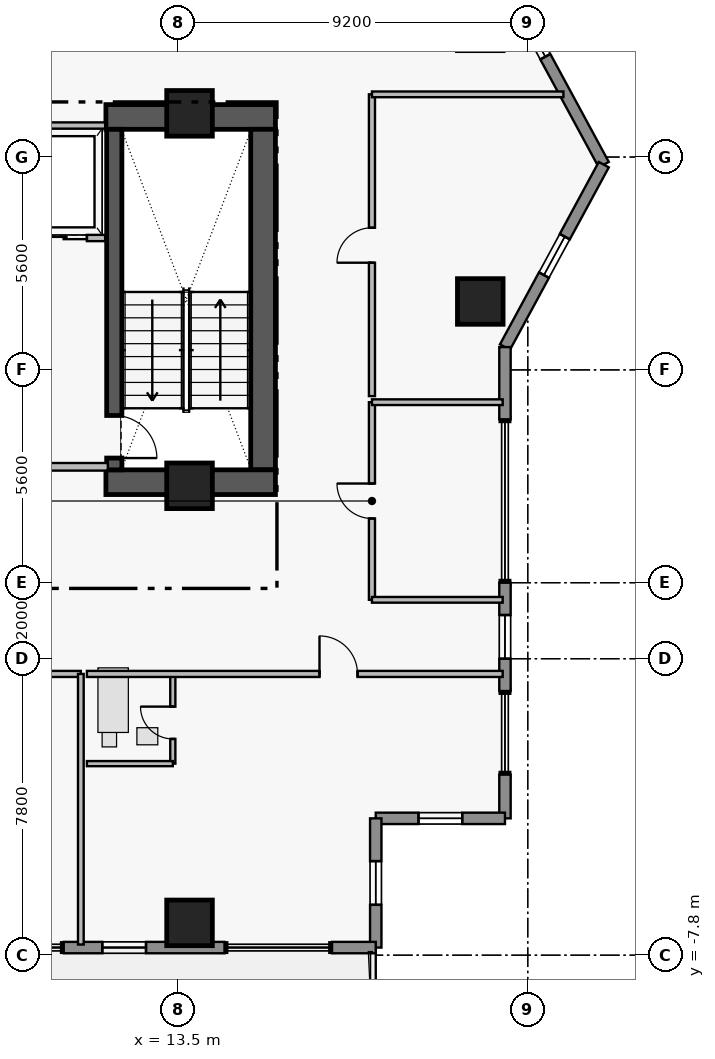
"""IFC4 building model, lengths in metres.
Left out: names, types, materials, properties, quantities, classifications, styles, units other than length and angle.
Written with IfcOpenShell. Run it as: python <this file> out.ifc"""

import sys

from ifc_helpers import new_model, si_unit, direction, frame, frame_2d, origin, origin_2d, place, context, subcontext, project, spatial, rectangle, extrude, element, fill, save


model = new_model("IFC4")
c1 = context("Model", 3, precision=1e-05, world=origin(), true_north=direction((0.0, 1.0)))
c2 = subcontext(c1, "Body", "Model", "MODEL_VIEW")
j1 = project(units=[si_unit("LENGTHUNIT", "METRE"), si_unit("PLANEANGLEUNIT", "RADIAN")], contexts=[c1])
p1 = place(None, origin())
s1 = spatial("IfcSite", under=j1, at=p1, CompositionType="ELEMENT")
p2 = place(p1, origin())
s2 = spatial("IfcBuilding", under=s1, at=p2, CompositionType="ELEMENT")
p3 = place(p2, frame((0.0, 0.0, 214.9)))
s3 = spatial("IfcBuildingStorey", under=s2, at=p3, CompositionType="ELEMENT", Elevation=214.9)
p4 = place(p3, frame((11.6, 14.255, 0.0), z_axis=(0.0, 0.0, 1.0), x_axis=(1.0, 0.0, 0.0)))
e1 = element("IfcWall", 1, at=p4, inside=s3, PredefinedType="SHEAR", context=c2, shape_type="SweptSolid", body=[
    extrude(rectangle(XDim=4.46, YDim=0.65, at=frame_2d((2.23, 0.0))), origin(), (0.0, 0.0, 1.0), 3.56),
])
p5 = place(p3, frame((15.735, 4.97, 0.0), z_axis=(0.0, 0.0, 1.0), x_axis=(0.0, 1.0, 0.0)))
e2 = element("IfcWall", 2, at=p5, inside=s3, PredefinedType="SHEAR", context=c2, shape_type="SweptSolid", body=[
    extrude(rectangle(XDim=8.96, YDim=0.65, at=frame_2d((4.48, 0.0))), origin(), (0.0, 0.0, 1.0), 3.56),
])
p6 = place(p3, frame((11.6, 4.645, 0.0), z_axis=(0.0, 0.0, 1.0), x_axis=(1.0, 0.0, 0.0)))
e3 = element("IfcWall", 3, at=p6, inside=s3, PredefinedType="SHEAR", context=c2, shape_type="SweptSolid", body=[
    extrude(rectangle(XDim=4.46, YDim=0.65, at=frame_2d((2.23, 0.0))), origin(), (0.0, 0.0, 1.0), 3.56),
])
p7 = place(p3, frame((11.82, 13.93, 0.0), z_axis=(0.0, 0.0, 1.0), x_axis=(0.0, -1.0, 0.0)))
e4 = element("IfcWall", 4, at=p7, inside=s3, PredefinedType="SHEAR", context=c2, shape_type="SweptSolid", body=[
    extrude(rectangle(XDim=8.96, YDim=0.4, at=frame_2d((4.48, 0.0))), origin(), (0.0, 0.0, 1.0), 3.56),
])
p8 = place(p7, frame((7.53, 0.0, 0.0)))
e5 = element("IfcOpeningElement", 5, at=p8, cuts=e4, PredefinedType="OPENING", context=c2, shape_type="SweptSolid", body=[
    extrude(rectangle(XDim=1.12, YDim=2.22, at=frame_2d((0.56, 1.11))), frame((0.0, 0.21, 0.0), z_axis=(0.0, -1.0, 0.0), x_axis=(1.0, 0.0, 0.0)), (0.0, 0.0, 1.0), 0.42),
])
for number, where, z_axis, x_axis in (
    (6, (13.8, 14.35, 0.0), (0.0, 0.0, 1.0), (1.0, 0.0, 0.0)),
    (7, (13.8, 4.55, 0.0), (0.0, 0.0, 1.0), (1.0, 0.0, 0.0)),
    (8, (13.8, -6.95, 0.0), (0.0, 0.0, 1.0), (1.0, 0.0, 0.0)),
    (9, (21.45, 9.4, 0.0), (0.0, 0.0, 1.0), (1.0, 0.0, 0.0)),
):
    element("IfcColumn", number, at=place(p3, frame(where, z_axis=z_axis, x_axis=x_axis)), inside=s3, PredefinedType="COLUMN", context=c2, shape_type="SweptSolid", body=[
        extrude(rectangle(XDim=1.2, YDim=1.2, at=origin_2d()), origin(), (0.0, 0.0, 1.0), 3.75),
    ])
p9 = place(p3, frame((22.1, 17.8, 0.0), z_axis=(0.0, 0.0, 1.0), x_axis=(0.476258655584, -0.879305233114, 0.0)))
e10 = element("IfcWall", 10, at=p9, inside=s3, PredefinedType="STANDARD", context=c2, shape_type="SweptSolid", body=[
    extrude(rectangle(XDim=5.459, YDim=0.3, at=frame_2d((2.729, 0.0))), origin(), (0.0, 0.0, 1.0), 3.53),
])
p10 = place(p9, frame((1.078, 0.0, 1.25)))
e11 = element("IfcOpeningElement", 11, at=p10, cuts=e10, PredefinedType="OPENING", context=c2, shape_type="SweptSolid", body=[
    extrude(rectangle(XDim=1.15, YDim=1.55, at=frame_2d((0.575, 0.775))), frame((0.0, 0.16, 0.0), z_axis=(0.0, -1.0, 0.0), x_axis=(1.0, 0.0, 0.0)), (0.0, 0.0, 1.0), 0.32),
])
p11 = place(p3, frame((24.7, 13.0, 0.0), z_axis=(0.0, 0.0, 1.0), x_axis=(-0.476258655584, -0.879305233114, 0.0)))
e12 = element("IfcWall", 12, at=p11, inside=s3, PredefinedType="STANDARD", context=c2, shape_type="SweptSolid", body=[
    extrude(rectangle(XDim=5.459, YDim=0.3, at=frame_2d((2.729, 0.0))), origin(), (0.0, 0.0, 1.0), 3.53),
])
p12 = place(p11, frame((2.155, 0.0, 1.25)))
e13 = element("IfcOpeningElement", 13, at=p12, cuts=e12, PredefinedType="OPENING", context=c2, shape_type="SweptSolid", body=[
    extrude(rectangle(XDim=1.15, YDim=1.55, at=frame_2d((0.575, 0.775))), frame((0.0, 0.16, 0.0), z_axis=(0.0, -1.0, 0.0), x_axis=(1.0, 0.0, 0.0)), (0.0, 0.0, 1.0), 0.32),
])
p13 = place(p3, frame((22.1, 8.2, 0.0), z_axis=(0.0, 0.0, 1.0), x_axis=(0.0, -1.0, 0.0)))
e14 = element("IfcWall", 14, at=p13, inside=s3, PredefinedType="STANDARD", context=c2, shape_type="SweptSolid", body=[
    extrude(rectangle(XDim=1.9, YDim=0.3, at=frame_2d((0.95, 0.0))), origin(), (0.0, 0.0, 1.0), 3.53),
])
p14 = place(p3, frame((22.1, 2.0, 0.0), z_axis=(0.0, 0.0, 1.0), x_axis=(0.0, -1.0, 0.0)))
e15 = element("IfcWall", 15, at=p14, inside=s3, PredefinedType="STANDARD", context=c2, shape_type="SweptSolid", body=[
    extrude(rectangle(XDim=2.85, YDim=0.3, at=frame_2d((1.425, 0.0))), origin(), (0.0, 0.0, 1.0), 3.53),
])
p15 = place(p14, frame((0.85, 0.0, 0.95)))
e16 = element("IfcOpeningElement", 16, at=p15, cuts=e15, PredefinedType="OPENING", context=c2, shape_type="SweptSolid", body=[
    extrude(rectangle(XDim=1.15, YDim=1.55, at=frame_2d((0.575, 0.775))), frame((0.0, 0.16, 0.0), z_axis=(0.0, -1.0, 0.0), x_axis=(1.0, 0.0, 0.0)), (0.0, 0.0, 1.0), 0.32),
])
p16 = place(p3, frame((22.1, -3.05, 0.0), z_axis=(0.0, 0.0, 1.0), x_axis=(0.0, -1.0, 0.0)))
e17 = element("IfcWall", 17, at=p16, inside=s3, PredefinedType="STANDARD", context=c2, shape_type="SweptSolid", body=[
    extrude(rectangle(XDim=1.15, YDim=0.3, at=frame_2d((0.575, 0.0))), origin(), (0.0, 0.0, 1.0), 3.53),
])
p17 = place(p3, frame((22.1, -4.2, 0.0), z_axis=(0.0, 0.0, 1.0), x_axis=(-1.0, 0.0, 0.0)))
e18 = element("IfcWall", 18, at=p17, inside=s3, PredefinedType="STANDARD", context=c2, shape_type="SweptSolid", body=[
    extrude(rectangle(XDim=3.4, YDim=0.3, at=frame_2d((1.7, 0.0))), origin(), (0.0, 0.0, 1.0), 3.53),
])
p18 = place(p17, frame((1.125, 0.0, 1.25)))
e19 = element("IfcOpeningElement", 19, at=p18, cuts=e18, PredefinedType="OPENING", context=c2, shape_type="SweptSolid", body=[
    extrude(rectangle(XDim=1.15, YDim=1.55, at=frame_2d((0.575, 0.775))), frame((0.0, 0.16, 0.0), z_axis=(0.0, -1.0, 0.0), x_axis=(1.0, 0.0, 0.0)), (0.0, 0.0, 1.0), 0.32),
])
p19 = place(p3, frame((18.7, -4.2, 0.0), z_axis=(0.0, 0.0, 1.0), x_axis=(0.0, -1.0, 0.0)))
e20 = element("IfcWall", 20, at=p19, inside=s3, PredefinedType="STANDARD", context=c2, shape_type="SweptSolid", body=[
    extrude(rectangle(XDim=3.4, YDim=0.3, at=frame_2d((1.7, 0.0))), origin(), (0.0, 0.0, 1.0), 3.53),
])
p20 = place(p19, frame((1.125, 0.0, 1.25)))
e21 = element("IfcOpeningElement", 21, at=p20, cuts=e20, PredefinedType="OPENING", context=c2, shape_type="SweptSolid", body=[
    extrude(rectangle(XDim=1.15, YDim=1.55, at=frame_2d((0.575, 0.775))), frame((0.0, 0.16, 0.0), z_axis=(0.0, -1.0, 0.0), x_axis=(1.0, 0.0, 0.0)), (0.0, 0.0, 1.0), 0.32),
])
p21 = place(p3, frame((18.7, -7.6, 0.0), z_axis=(0.0, 0.0, 1.0), x_axis=(-1.0, 0.0, 0.0)))
e22 = element("IfcWall", 22, at=p21, inside=s3, PredefinedType="STANDARD", context=c2, shape_type="SweptSolid", body=[
    extrude(rectangle(XDim=1.15, YDim=0.3, at=frame_2d((0.575, 0.0))), origin(), (0.0, 0.0, 1.0), 3.53),
])
p22 = place(p3, frame((14.72, -7.6, 0.0), z_axis=(0.0, 0.0, 1.0), x_axis=(-1.0, 0.0, 0.0)))
e23 = element("IfcWall", 23, at=p22, inside=s3, PredefinedType="STANDARD", context=c2, shape_type="SweptSolid", body=[
    extrude(rectangle(XDim=4.23, YDim=0.3, at=frame_2d((2.115, 0.0))), origin(), (0.0, 0.0, 1.0), 3.53),
])
p23 = place(p22, frame((2.065, 0.0, 0.95)))
e24 = element("IfcOpeningElement", 24, at=p23, cuts=e23, PredefinedType="OPENING", context=c2, shape_type="SweptSolid", body=[
    extrude(rectangle(XDim=1.15, YDim=1.55, at=frame_2d((0.575, 0.775))), frame((0.0, 0.16, 0.0), z_axis=(0.0, -1.0, 0.0), x_axis=(1.0, 0.0, 0.0)), (0.0, 0.0, 1.0), 0.32),
])
p24 = place(p3, frame((9.42, 11.07, 0.0), z_axis=(0.0, 0.0, 1.0), x_axis=(1.0, 0.0, 0.0)))
e25 = element("IfcWall", 25, at=p24, inside=s3, PredefinedType="PARTITIONING", context=c2, shape_type="SweptSolid", body=[
    extrude(rectangle(XDim=2.16, YDim=0.165, at=frame_2d((1.08, 0.0))), origin(), (0.0, 0.0, 1.0), 3.53),
])
p25 = place(p24, frame((0.53, 0.0, 0.0)))
e26 = element("IfcOpeningElement", 26, at=p25, cuts=e25, PredefinedType="OPENING", context=c2, shape_type="SweptSolid", body=[
    extrude(rectangle(XDim=1.15, YDim=2.25, at=frame_2d((0.575, 1.125))), frame((0.0, 0.093, 0.0), z_axis=(0.0, -1.0, 0.0), x_axis=(1.0, 0.0, 0.0)), (0.0, 0.0, 1.0), 0.185),
])
p26 = place(p3, frame((0.0, -0.4, 0.0), z_axis=(0.0, 0.0, 1.0), x_axis=(1.0, 0.0, 0.0)))
e27 = element("IfcWall", 27, at=p26, inside=s3, PredefinedType="PARTITIONING", context=c2, shape_type="SweptSolid", body=[
    extrude(rectangle(XDim=10.94, YDim=0.16, at=frame_2d((5.47, 0.0))), origin(), (0.0, 0.0, 1.0), 3.53),
])
p27 = place(p26, frame((6.12, 0.0, 0.0)))
e28 = element("IfcOpeningElement", 28, at=p27, cuts=e27, PredefinedType="OPENING", context=c2, shape_type="SweptSolid", body=[
    extrude(rectangle(XDim=1.0, YDim=2.15, at=frame_2d((0.5, 1.075))), frame((0.0, 0.09, 0.0), z_axis=(0.0, -1.0, 0.0), x_axis=(1.0, 0.0, 0.0)), (0.0, 0.0, 1.0), 0.18),
])
p28 = place(p3, frame((13.36, -2.76, 0.0), z_axis=(0.0, 0.0, 1.0), x_axis=(0.0, 1.0, 0.0)))
e29 = element("IfcWall", 29, at=p28, inside=s3, PredefinedType="PLUMBINGWALL", context=c2, shape_type="SweptSolid", body=[
    extrude(rectangle(XDim=2.36, YDim=0.135, at=frame_2d((1.18, 0.0))), origin(), (0.0, 0.0, 1.0), 2.923),
])
p29 = place(p28, frame((0.65, 0.0, 0.0)))
e30 = element("IfcOpeningElement", 30, at=p29, cuts=e29, PredefinedType="OPENING", context=c2, shape_type="SweptSolid", body=[
    extrude(rectangle(XDim=0.85, YDim=2.1, at=frame_2d((0.425, 1.05))), frame((0.0, 0.077, 0.0), z_axis=(0.0, -1.0, 0.0), x_axis=(1.0, 0.0, 0.0)), (0.0, 0.0, 1.0), 0.155),
])
p30 = place(p3, frame((11.1, -0.4, 0.0), z_axis=(0.0, 0.0, 1.0), x_axis=(1.0, 0.0, 0.0)))
e31 = element("IfcWall", 31, at=p30, inside=s3, PredefinedType="PARTITIONING", context=c2, shape_type="SweptSolid", body=[
    extrude(rectangle(XDim=10.94, YDim=0.16, at=frame_2d((5.47, 0.0))), origin(), (0.0, 0.0, 1.0), 3.53),
])
p31 = place(p30, frame((6.12, 0.0, 0.0)))
e32 = element("IfcOpeningElement", 32, at=p31, cuts=e31, PredefinedType="OPENING", context=c2, shape_type="SweptSolid", body=[
    extrude(rectangle(XDim=1.0, YDim=2.15, at=frame_2d((0.5, 1.075))), frame((0.0, 0.09, 0.0), z_axis=(0.0, -1.0, 0.0), x_axis=(1.0, 0.0, 0.0)), (0.0, 0.0, 1.0), 0.18),
])
p32 = place(p3, frame((18.6, 1.55, 0.0), z_axis=(0.0, 0.0, 1.0), x_axis=(0.0, 1.0, 0.0)))
e33 = element("IfcWall", 33, at=p32, inside=s3, PredefinedType="PARTITIONING", context=c2, shape_type="SweptSolid", body=[
    extrude(rectangle(XDim=5.2, YDim=0.16, at=frame_2d((2.6, 0.0))), origin(), (0.0, 0.0, 1.0), 3.53),
])
p33 = place(p32, frame((2.14, 0.0, 0.0)))
e34 = element("IfcOpeningElement", 34, at=p33, cuts=e33, PredefinedType="OPENING", context=c2, shape_type="SweptSolid", body=[
    extrude(rectangle(XDim=0.92, YDim=2.12, at=frame_2d((0.46, 1.06))), frame((0.0, 0.09, 0.0), z_axis=(0.0, -1.0, 0.0), x_axis=(1.0, 0.0, 0.0)), (0.0, 0.0, 1.0), 0.18),
])
p34 = place(p3, frame((18.6, 6.91, 0.0), z_axis=(0.0, 0.0, 1.0), x_axis=(0.0, 1.0, 0.0)))
e35 = element("IfcWall", 35, at=p34, inside=s3, PredefinedType="PARTITIONING", context=c2, shape_type="SweptSolid", body=[
    extrude(rectangle(XDim=7.94, YDim=0.16, at=frame_2d((3.97, 0.0))), origin(), (0.0, 0.0, 1.0), 3.53),
])
p35 = place(p34, frame((3.51, 0.0, 0.0)))
e36 = element("IfcOpeningElement", 36, at=p35, cuts=e35, PredefinedType="OPENING", context=c2, shape_type="SweptSolid", body=[
    extrude(rectangle(XDim=0.92, YDim=2.12, at=frame_2d((0.46, 1.06))), frame((0.0, 0.09, 0.0), z_axis=(0.0, -1.0, 0.0), x_axis=(1.0, 0.0, 0.0)), (0.0, 0.0, 1.0), 0.18),
])
p36 = place(p3, frame((8.8, 5.05, 0.0), z_axis=(0.0, 0.0, 1.0), x_axis=(1.0, 0.0, 0.0)))
e37 = element("IfcWall", 37, at=p36, inside=s3, PredefinedType="PARTITIONING", context=c2, shape_type="SweptSolid", body=[
    extrude(rectangle(XDim=2.85, YDim=0.2, at=frame_2d((1.425, 0.0))), origin(), (0.0, 0.0, 1.0), 3.53),
])
p37 = place(p3, frame((9.42, 14.03, 0.0), z_axis=(0.0, 0.0, 1.0), x_axis=(1.0, 0.0, 0.0)))
e38 = element("IfcWall", 38, at=p37, inside=s3, PredefinedType="PARTITIONING", context=c2, shape_type="SweptSolid", body=[
    extrude(rectangle(XDim=2.16, YDim=0.165, at=frame_2d((1.08, 0.0))), origin(), (0.0, 0.0, 1.0), 3.53),
])
p38 = place(p3, frame((10.94, -7.52, 0.0), z_axis=(0.0, 0.0, 1.0), x_axis=(0.0, 1.0, 0.0)))
e39 = element("IfcWall", 39, at=p38, inside=s3, PredefinedType="PARTITIONING", context=c2, shape_type="SweptSolid", body=[
    extrude(rectangle(XDim=7.12, YDim=0.15, at=frame_2d((3.56, 0.0))), origin(), (0.0, 0.0, 1.0), 3.53),
])
p39 = place(p3, frame((11.1, -2.76, 0.0), z_axis=(0.0, 0.0, 1.0), x_axis=(1.0, 0.0, 0.0)))
e40 = element("IfcWall", 40, at=p39, inside=s3, PredefinedType="PLUMBINGWALL", context=c2, shape_type="SweptSolid", body=[
    extrude(rectangle(XDim=2.26, YDim=0.135, at=frame_2d((1.13, 0.0))), origin(), (0.0, 0.0, 1.0), 3.124),
])
for number, where, z_axis, x_axis in (
    (41, (18.6, 1.55, 0.0), (0.0, 0.0, 1.0), (1.0, 0.0, 0.0)),
    (42, (18.6, 6.75, 0.0), (0.0, 0.0, 1.0), (1.0, 0.0, 0.0)),
):
    element("IfcWall", number, at=place(p3, frame(where, z_axis=z_axis, x_axis=x_axis)), inside=s3, PredefinedType="PARTITIONING", context=c2, shape_type="SweptSolid", body=[
        extrude(rectangle(XDim=3.44, YDim=0.15, at=frame_2d((1.72, 0.0))), origin(), (0.0, 0.0, 1.0), 3.53),
    ])
p40 = place(p3, frame((18.6, 14.85, 0.0), z_axis=(0.0, 0.0, 1.0), x_axis=(1.0, 0.0, 0.0)))
e43 = element("IfcWall", 43, at=p40, inside=s3, PredefinedType="PARTITIONING", context=c2, shape_type="SweptSolid", body=[
    extrude(rectangle(XDim=5.038, YDim=0.15, at=frame_2d((2.519, 0.0))), origin(), (0.0, 0.0, 1.0), 3.53),
])
p41 = place(p10, origin())
e44 = element("IfcWindow", 44, at=p41, inside=s3, PartitioningType="SINGLE_PANEL", PredefinedType="WINDOW", context=c2, shape_type="SweptSolid", body=[
    extrude(rectangle(XDim=1.15, YDim=1.55, at=frame_2d((0.575, 0.775))), frame((0.0, 0.03, 0.0), z_axis=(0.0, -1.0, 0.0), x_axis=(1.0, 0.0, 0.0)), (0.0, 0.0, 1.0), 0.06),
])
fill(e11, e44)
p42 = place(p12, origin())
e45 = element("IfcWindow", 45, at=p42, inside=s3, PartitioningType="SINGLE_PANEL", PredefinedType="WINDOW", context=c2, shape_type="SweptSolid", body=[
    extrude(rectangle(XDim=1.15, YDim=1.55, at=frame_2d((0.575, 0.775))), frame((0.0, 0.03, 0.0), z_axis=(0.0, -1.0, 0.0), x_axis=(1.0, 0.0, 0.0)), (0.0, 0.0, 1.0), 0.06),
])
fill(e13, e45)
p43 = place(p15, origin())
e46 = element("IfcWindow", 46, at=p43, inside=s3, PartitioningType="SINGLE_PANEL", PredefinedType="WINDOW", context=c2, shape_type="SweptSolid", body=[
    extrude(rectangle(XDim=1.15, YDim=1.55, at=frame_2d((0.575, 0.775))), frame((0.0, 0.03, 0.0), z_axis=(0.0, -1.0, 0.0), x_axis=(1.0, 0.0, 0.0)), (0.0, 0.0, 1.0), 0.06),
])
fill(e16, e46)
p44 = place(p18, origin())
e47 = element("IfcWindow", 47, at=p44, inside=s3, PartitioningType="SINGLE_PANEL", PredefinedType="WINDOW", context=c2, shape_type="SweptSolid", body=[
    extrude(rectangle(XDim=1.15, YDim=1.55, at=frame_2d((0.575, 0.775))), frame((0.0, 0.03, 0.0), z_axis=(0.0, -1.0, 0.0), x_axis=(1.0, 0.0, 0.0)), (0.0, 0.0, 1.0), 0.06),
])
fill(e19, e47)
p45 = place(p20, origin())
e48 = element("IfcWindow", 48, at=p45, inside=s3, PartitioningType="SINGLE_PANEL", PredefinedType="WINDOW", context=c2, shape_type="SweptSolid", body=[
    extrude(rectangle(XDim=1.15, YDim=1.55, at=frame_2d((0.575, 0.775))), frame((0.0, 0.03, 0.0), z_axis=(0.0, -1.0, 0.0), x_axis=(1.0, 0.0, 0.0)), (0.0, 0.0, 1.0), 0.06),
])
fill(e21, e48)
p46 = place(p23, origin())
e49 = element("IfcWindow", 49, at=p46, inside=s3, PartitioningType="SINGLE_PANEL", PredefinedType="WINDOW", context=c2, shape_type="SweptSolid", body=[
    extrude(rectangle(XDim=1.15, YDim=1.55, at=frame_2d((0.575, 0.775))), frame((0.0, 0.03, 0.0), z_axis=(0.0, -1.0, 0.0), x_axis=(1.0, 0.0, 0.0)), (0.0, 0.0, 1.0), 0.06),
])
fill(e24, e49)
p47 = place(p8, origin())
e50 = element("IfcDoor", 50, at=p47, inside=s3, OperationType="SINGLE_SWING_RIGHT", PredefinedType="DOOR", context=c2, shape_type="SweptSolid", body=[
    extrude(rectangle(XDim=1.12, YDim=2.22, at=frame_2d((0.56, 1.11))), frame((0.0, 0.025, 0.0), z_axis=(0.0, -1.0, 0.0), x_axis=(1.0, 0.0, 0.0)), (0.0, 0.0, 1.0), 0.05),
])
fill(e5, e50)
p48 = place(p25, origin())
e51 = element("IfcDoor", 51, at=p48, inside=s3, OperationType="SLIDING_TO_LEFT", PredefinedType="DOOR", context=c2, shape_type="SweptSolid", body=[
    extrude(rectangle(XDim=1.15, YDim=2.25, at=frame_2d((0.575, 1.125))), frame((0.0, 0.025, 0.0), z_axis=(0.0, -1.0, 0.0), x_axis=(1.0, 0.0, 0.0)), (0.0, 0.0, 1.0), 0.05),
])
fill(e26, e51)
p49 = place(p29, origin())
e52 = element("IfcDoor", 52, at=p49, inside=s3, OperationType="SINGLE_SWING_RIGHT", PredefinedType="DOOR", context=c2, shape_type="SweptSolid", body=[
    extrude(rectangle(XDim=0.85, YDim=2.1, at=frame_2d((0.425, 1.05))), frame((0.0, 0.025, 0.0), z_axis=(0.0, -1.0, 0.0), x_axis=(1.0, 0.0, 0.0)), (0.0, 0.0, 1.0), 0.05),
])
fill(e30, e52)
p50 = place(p31, origin())
e53 = element("IfcDoor", 53, at=p50, inside=s3, OperationType="SINGLE_SWING_LEFT", PredefinedType="DOOR", context=c2, shape_type="SweptSolid", body=[
    extrude(rectangle(XDim=1.0, YDim=2.15, at=frame_2d((0.5, 1.075))), frame((0.0, 0.025, 0.0), z_axis=(0.0, -1.0, 0.0), x_axis=(1.0, 0.0, 0.0)), (0.0, 0.0, 1.0), 0.05),
])
fill(e32, e53)
p51 = place(p33, origin())
e54 = element("IfcDoor", 54, at=p51, inside=s3, OperationType="SINGLE_SWING_RIGHT", PredefinedType="DOOR", context=c2, shape_type="SweptSolid", body=[
    extrude(rectangle(XDim=0.92, YDim=2.12, at=frame_2d((0.46, 1.06))), frame((0.0, 0.025, 0.0), z_axis=(0.0, -1.0, 0.0), x_axis=(1.0, 0.0, 0.0)), (0.0, 0.0, 1.0), 0.05),
])
fill(e34, e54)
p52 = place(p35, origin())
e55 = element("IfcDoor", 55, at=p52, inside=s3, OperationType="SINGLE_SWING_LEFT", PredefinedType="DOOR", context=c2, shape_type="SweptSolid", body=[
    extrude(rectangle(XDim=0.92, YDim=2.12, at=frame_2d((0.46, 1.06))), frame((0.0, 0.025, 0.0), z_axis=(0.0, -1.0, 0.0), x_axis=(1.0, 0.0, 0.0)), (0.0, 0.0, 1.0), 0.05),
])
fill(e36, e55)
save(model, sys.argv[1])
